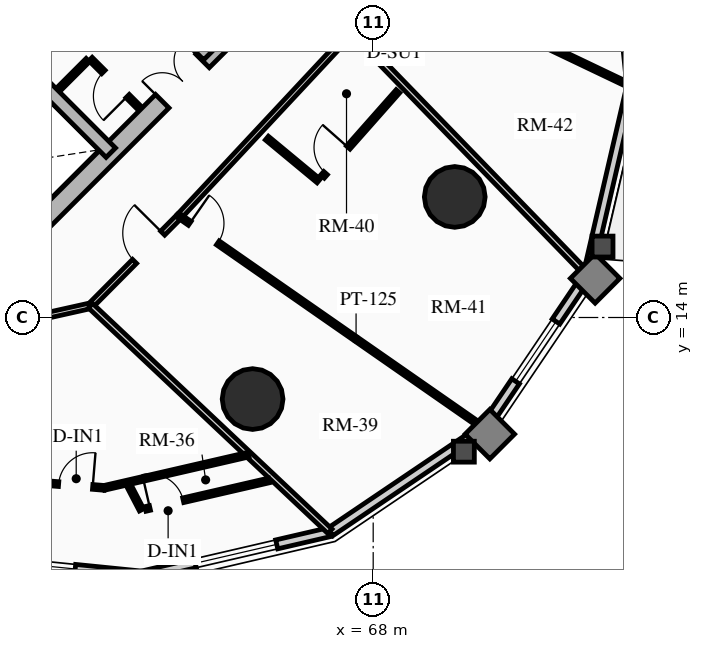
"""IFC4 building model, lengths in metres.
Left out: names, types, materials, properties, quantities, classifications, styles, units other than length and angle.
Written with IfcOpenShell. Run it as: python <this file> out.ifc"""

import sys

from ifc_helpers import new_model, si_unit, direction, frame, frame_2d, origin, origin_2d, place, context, subcontext, project, spatial, rectangle, circle, extrude, source, transform, mapped, element, fill, save


model = new_model("IFC4")
c1 = context("Model", 3, precision=1e-05, world=origin(), true_north=direction((0.0, 1.0)))
c2 = subcontext(c1, "Body", "Model", "MODEL_VIEW")
j1 = project(units=[si_unit("LENGTHUNIT", "METRE"), si_unit("PLANEANGLEUNIT", "RADIAN")], contexts=[c1])
p1 = place(None, origin())
s1 = spatial("IfcSite", under=j1, at=p1, CompositionType="ELEMENT")
p2 = place(p1, origin())
s2 = spatial("IfcBuilding", under=s1, at=p2, CompositionType="ELEMENT")
p3 = place(p2, frame((0.0, 0.0, 39.46)))
s3 = spatial("IfcBuildingStorey", under=s2, at=p3, CompositionType="ELEMENT", Elevation=39.46)
p4 = place(p3, frame((58.596, 15.838, 0.0), z_axis=(0.0, 0.0, 1.0), x_axis=(0.707106781187, 0.707106781187, 0.0)))
e1 = element("IfcWall", 1, at=p4, inside=s3, PredefinedType="SHEAR", context=c2, shape_type="SweptSolid", body=[
    extrude(rectangle(XDim=10.7, YDim=0.5, at=frame_2d((5.35, 0.0))), origin(), (0.0, 0.0, 1.0), 2.91),
])
m1 = source(origin(), c2, "Body", "SweptSolid", [
    extrude(rectangle(XDim=1.5, YDim=2.02, at=frame_2d((0.75, 1.01))), frame((0.0, 0.26, 0.0), z_axis=(0.0, -1.0, 0.0), x_axis=(1.0, 0.0, 0.0)), (0.0, 0.0, 1.0), 0.52),
])
p5 = place(p4, frame((5.45, 0.0, 0.0)))
e2 = element("IfcOpeningElement", 2, at=p5, cuts=e1, PredefinedType="OPENING", context=c2, shape_type="MappedRepresentation", body=[
    mapped(m1, transform((0.0, 0.0, 0.0), x_axis=(1.0, 0.0, 0.0), y_axis=(0.0, 1.0, 0.0), z_axis=(0.0, 0.0, 1.0), scale=1.0)),
])
p6 = place(p3, frame((61.096, 18.338, 0.0), z_axis=(0.0, 0.0, 1.0), x_axis=(-0.707106781187, 0.707106781187, 0.0)))
e3 = element("IfcWall", 3, at=p6, inside=s3, PredefinedType="SHEAR", context=c2, shape_type="SweptSolid", body=[
    extrude(rectangle(XDim=13.8, YDim=0.35, at=frame_2d((6.9, 0.0))), origin(), (0.0, 0.0, 1.0), 2.91),
])
m2 = source(origin(), c2, "Body", "SweptSolid", [
    extrude(rectangle(XDim=1.1, YDim=2.015, at=frame_2d((0.55, 1.007))), frame((0.0, 0.185, 0.0), z_axis=(0.0, -1.0, 0.0), x_axis=(1.0, 0.0, 0.0)), (0.0, 0.0, 1.0), 0.37),
])
p7 = place(p6, frame((4.9, 0.0, 0.0)))
e4 = element("IfcOpeningElement", 4, at=p7, cuts=e3, PredefinedType="OPENING", context=c2, shape_type="MappedRepresentation", body=[
    mapped(m2, transform((0.0, 0.0, 0.0), x_axis=(1.0, 0.0, 0.0), y_axis=(0.0, 1.0, 0.0), z_axis=(0.0, 0.0, 1.0), scale=1.0)),
])
m3 = source(origin(), c2, "Body", "SweptSolid", [
    extrude(rectangle(XDim=1.15, YDim=2.02, at=frame_2d((0.575, 1.01))), frame((0.0, 0.185, 0.0), z_axis=(0.0, -1.0, 0.0), x_axis=(1.0, 0.0, 0.0)), (0.0, 0.0, 1.0), 0.37),
])
p8 = place(p6, frame((7.32, 0.0, 0.0)))
e5 = element("IfcOpeningElement", 5, at=p8, cuts=e3, PredefinedType="OPENING", context=c2, shape_type="MappedRepresentation", body=[
    mapped(m3, transform((0.0, 0.0, 0.0), x_axis=(1.0, 0.0, 0.0), y_axis=(0.0, 1.0, 0.0), z_axis=(0.0, 0.0, 1.0), scale=1.0)),
])
p9 = place(p3, frame((63.662, 20.904, 0.0), z_axis=(0.0, 0.0, 1.0), x_axis=(-0.707106781187, 0.707106781187, 0.0)))
e6 = element("IfcWall", 6, at=p9, inside=s3, PredefinedType="SHEAR", context=c2, shape_type="SweptSolid", body=[
    extrude(rectangle(XDim=13.8, YDim=0.35, at=frame_2d((6.9, 0.0))), origin(), (0.0, 0.0, 1.0), 2.91),
])
p10 = place(p9, frame((10.025, 0.0, 0.0)))
e7 = element("IfcOpeningElement", 7, at=p10, cuts=e6, PredefinedType="OPENING", context=c2, shape_type="MappedRepresentation", body=[
    mapped(m2, transform((0.0, 0.0, 0.0), x_axis=(1.0, 0.0, 0.0), y_axis=(0.0, 1.0, 0.0), z_axis=(0.0, 0.0, 1.0), scale=1.0)),
])
p11 = place(p9, frame((12.025, 0.0, 0.0)))
e8 = element("IfcOpeningElement", 8, at=p11, cuts=e6, PredefinedType="OPENING", context=c2, shape_type="MappedRepresentation", body=[
    mapped(m2, transform((0.0, 0.0, 0.0), x_axis=(1.0, 0.0, 0.0), y_axis=(0.0, 1.0, 0.0), z_axis=(0.0, 0.0, 1.0), scale=1.0)),
])
p12 = place(p9, frame((5.33, 0.0, 0.0)))
e9 = element("IfcOpeningElement", 9, at=p12, cuts=e6, PredefinedType="OPENING", context=c2, shape_type="MappedRepresentation", body=[
    mapped(m3, transform((0.0, 0.0, 0.0), x_axis=(1.0, 0.0, 0.0), y_axis=(0.0, 1.0, 0.0), z_axis=(0.0, 0.0, 1.0), scale=1.0)),
])
for number, where, z_axis, x_axis in (
    (10, (64.827, 11.854, 0.0), (0.0, 0.0, 1.0), (1.0, 0.0, 0.0)),
    (11, (70.146, 17.173, 0.0), (0.0, 0.0, 1.0), (1.0, 0.0, 0.0)),
):
    element("IfcColumn", number, at=place(p3, frame(where, z_axis=z_axis, x_axis=x_axis)), inside=s3, PredefinedType="USERDEFINED", context=c2, shape_type="SweptSolid", body=[
        extrude(circle(Radius=0.8, at=origin_2d()), origin(), (0.0, 0.0, 1.0), 2.91),
    ])
p13 = place(p3, frame((61.91, 7.206, 0.0), z_axis=(0.0, 0.0, 1.0), x_axis=(-0.994968263437, 0.100190592135, 0.0)))
e12 = element("IfcWall", 12, at=p13, inside=s3, PredefinedType="SOLIDWALL", context=c2, shape_type="SweptSolid", body=[
    extrude(rectangle(XDim=5.419, YDim=0.24, at=frame_2d((2.71, 0.0))), origin(), (0.0, 0.0, 1.0), 2.073),
])
m4 = source(origin(), c2, "Body", "SweptSolid", [
    extrude(rectangle(XDim=1.9, YDim=1.35, at=frame_2d((0.95, 0.675))), frame((0.0, 0.13, 0.0), z_axis=(0.0, -1.0, 0.0), x_axis=(1.0, 0.0, 0.0)), (0.0, 0.0, 1.0), 0.26),
])
p14 = place(p13, frame((1.76, 0.0, 0.65)))
e13 = element("IfcOpeningElement", 13, at=p14, cuts=e12, PredefinedType="OPENING", context=c2, shape_type="MappedRepresentation", body=[
    mapped(m4, transform((0.0, 0.0, 0.0), x_axis=(1.0, 0.0, 0.0), y_axis=(0.0, 1.0, 0.0), z_axis=(0.0, 0.0, 1.0), scale=1.0)),
])
p15 = place(p3, frame((66.871, 8.356, 0.0), z_axis=(0.0, 0.0, 1.0), x_axis=(-0.974167686491, -0.22582585901, 0.0)))
e14 = element("IfcWall", 14, at=p15, inside=s3, PredefinedType="SOLIDWALL", context=c2, shape_type="SweptSolid", body=[
    extrude(rectangle(XDim=5.092, YDim=0.24, at=frame_2d((2.546, 0.0))), origin(), (0.0, 0.0, 1.0), 2.073),
])
m5 = source(origin(), c2, "Body", "SweptSolid", [
    extrude(rectangle(XDim=2.2, YDim=1.35, at=frame_2d((1.1, 0.675))), frame((0.0, 0.13, 0.0), z_axis=(0.0, -1.0, 0.0), x_axis=(1.0, 0.0, 0.0)), (0.0, 0.0, 1.0), 0.26),
])
p16 = place(p15, frame((1.446, 0.0, 0.65)))
e15 = element("IfcOpeningElement", 15, at=p16, cuts=e14, PredefinedType="OPENING", context=c2, shape_type="MappedRepresentation", body=[
    mapped(m5, transform((0.0, 0.0, 0.0), x_axis=(1.0, 0.0, 0.0), y_axis=(0.0, 1.0, 0.0), z_axis=(0.0, 0.0, 1.0), scale=1.0)),
])
p17 = place(p3, frame((70.914, 11.086, 0.0), z_axis=(0.0, 0.0, 1.0), x_axis=(-0.828748297084, -0.559621532896, 0.0)))
e16 = element("IfcWall", 16, at=p17, inside=s3, PredefinedType="SOLIDWALL", context=c2, shape_type="SweptSolid", body=[
    extrude(rectangle(XDim=4.879, YDim=0.24, at=frame_2d((2.439, 0.0))), origin(), (0.0, 0.0, 1.0), 2.073),
])
p18 = place(p3, frame((73.644, 15.129, 0.0), z_axis=(0.0, 0.0, 1.0), x_axis=(-0.559621532896, -0.828748297084, 0.0)))
e17 = element("IfcWall", 17, at=p18, inside=s3, PredefinedType="SOLIDWALL", context=c2, shape_type="SweptSolid", body=[
    extrude(rectangle(XDim=4.879, YDim=0.24, at=frame_2d((2.439, 0.0))), origin(), (0.0, 0.0, 1.0), 2.073),
])
p19 = place(p18, frame((1.489, 0.0, 0.65)))
e18 = element("IfcOpeningElement", 18, at=p19, cuts=e17, PredefinedType="OPENING", context=c2, shape_type="MappedRepresentation", body=[
    mapped(m4, transform((0.0, 0.0, 0.0), x_axis=(1.0, 0.0, 0.0), y_axis=(0.0, 1.0, 0.0), z_axis=(0.0, 0.0, 1.0), scale=1.0)),
])
p20 = place(p3, frame((74.794, 20.09, 0.0), z_axis=(0.0, 0.0, 1.0), x_axis=(-0.22582585901, -0.974167686491, 0.0)))
e19 = element("IfcWall", 19, at=p20, inside=s3, PredefinedType="SOLIDWALL", context=c2, shape_type="SweptSolid", body=[
    extrude(rectangle(XDim=5.092, YDim=0.24, at=frame_2d((2.546, 0.0))), origin(), (0.0, 0.0, 1.0), 2.073),
])
p21 = place(p3, frame((74.251, 25.482, 0.0), z_axis=(0.0, 0.0, 1.0), x_axis=(0.100190592135, -0.994968263437, 0.0)))
e20 = element("IfcWall", 20, at=p21, inside=s3, PredefinedType="SOLIDWALL", context=c2, shape_type="SweptSolid", body=[
    extrude(rectangle(XDim=5.419, YDim=0.24, at=frame_2d((2.71, 0.0))), origin(), (0.0, 0.0, 1.0), 2.073),
])
p22 = place(p21, frame((1.76, 0.0, 0.65)))
e21 = element("IfcOpeningElement", 21, at=p22, cuts=e20, PredefinedType="OPENING", context=c2, shape_type="MappedRepresentation", body=[
    mapped(m4, transform((0.0, 0.0, 0.0), x_axis=(1.0, 0.0, 0.0), y_axis=(0.0, 1.0, 0.0), z_axis=(0.0, 0.0, 1.0), scale=1.0)),
])
p23 = place(p3, frame((61.835, 19.529, 0.0), z_axis=(0.0, 0.0, 1.0), x_axis=(-0.707174592913, 0.707038962956, 0.0)))
e22 = element("IfcWall", 22, at=p23, inside=s3, PredefinedType="PARTITIONING", context=c2, shape_type="SweptSolid", body=[
    extrude(rectangle(XDim=1.8, YDim=0.125, at=frame_2d((0.9, 0.0))), origin(), (0.0, 0.0, 1.0), 2.635),
])
m6 = source(origin(), c2, "Body", "SweptSolid", [
    extrude(rectangle(XDim=0.9, YDim=2.005, at=frame_2d((0.45, 1.002))), frame((0.0, 0.073, 0.0), z_axis=(0.0, -1.0, 0.0), x_axis=(1.0, 0.0, 0.0)), (0.0, 0.0, 1.0), 0.145),
])
p24 = place(p23, frame((0.42, 0.0, 0.0)))
e23 = element("IfcOpeningElement", 23, at=p24, cuts=e22, PredefinedType="OPENING", context=c2, shape_type="MappedRepresentation", body=[
    mapped(m6, transform((0.0, 0.0, 0.0), x_axis=(1.0, 0.0, 0.0), y_axis=(0.0, 1.0, 0.0), z_axis=(0.0, 0.0, 1.0), scale=1.0)),
])
p25 = place(p3, frame((59.713, 19.996, 0.0), z_axis=(0.0, 0.0, 1.0), x_axis=(0.707217726, 0.706995818963, 0.0)))
e24 = element("IfcWall", 24, at=p25, inside=s3, PredefinedType="PARTITIONING", context=c2, shape_type="SweptSolid", body=[
    extrude(rectangle(XDim=1.1, YDim=0.125, at=frame_2d((0.55, 0.0))), origin(), (0.0, 0.0, 1.0), 2.635),
])
p26 = place(p3, frame((59.008, 13.963, 0.0), z_axis=(0.0, 0.0, 1.0), x_axis=(0.976020856791, 0.21767702476, 0.0)))
e25 = element("IfcWall", 25, at=p26, inside=s3, PredefinedType="PARTITIONING", context=c2, shape_type="SweptSolid", body=[
    extrude(rectangle(XDim=1.593, YDim=0.15, at=frame_2d((0.796, 0.0))), origin(), (0.0, 0.0, 1.0), 2.205),
])
p27 = place(p3, frame((60.562, 14.31, 0.0), z_axis=(0.0, 0.0, 1.0), x_axis=(0.704566236161, 0.709638230975, 0.0)))
e26 = element("IfcWall", 26, at=p27, inside=s3, PredefinedType="PARTITIONING", context=c2, shape_type="SweptSolid", body=[
    extrude(rectangle(XDim=3.321, YDim=0.15, at=frame_2d((1.661, 0.0))), origin(), (0.0, 0.0, 1.0), 2.159),
])
m7 = source(origin(), c2, "Body", "SweptSolid", [
    extrude(rectangle(XDim=1.05, YDim=2.015, at=frame_2d((0.525, 1.007))), frame((0.0, 0.085, 0.0), z_axis=(0.0, -1.0, 0.0), x_axis=(1.0, 0.0, 0.0)), (0.0, 0.0, 1.0), 0.17),
])
p28 = place(p27, frame((1.643, 0.0, 0.0)))
e27 = element("IfcOpeningElement", 27, at=p28, cuts=e26, PredefinedType="OPENING", context=c2, shape_type="MappedRepresentation", body=[
    mapped(m7, transform((0.0, 0.0, 0.0), x_axis=(1.0, 0.0, 0.0), y_axis=(0.0, 1.0, 0.0), z_axis=(0.0, 0.0, 1.0), scale=1.0)),
])
p29 = place(p3, frame((62.903, 16.667, 0.0), z_axis=(0.0, 0.0, 1.0), x_axis=(0.682371947497, 0.731005147225, 0.0)))
e28 = element("IfcWall", 28, at=p29, inside=s3, PredefinedType="PARTITIONING", context=c2, shape_type="SweptSolid", body=[
    extrude(rectangle(XDim=6.642, YDim=0.15, at=frame_2d((3.321, 0.0))), origin(), (0.0, 0.0, 1.0), 2.159),
])
p30 = place(p3, frame((60.562, 14.31, 0.0), z_axis=(0.0, 0.0, 1.0), x_axis=(0.727781661561, -0.685808904211, 0.0)))
e29 = element("IfcWall", 29, at=p30, inside=s3, PredefinedType="PARTITIONING", context=c2, shape_type="SweptSolid", body=[
    extrude(rectangle(XDim=8.655, YDim=0.16, at=frame_2d((4.328, 0.0))), origin(), (0.0, 0.0, 1.0), 2.073),
])
p31 = place(p3, frame((67.435, 21.521, 0.0), z_axis=(0.0, 0.0, 1.0), x_axis=(0.6962628802, -0.717786877601, 0.0)))
e30 = element("IfcWall", 30, at=p31, inside=s3, PredefinedType="PARTITIONING", context=c2, shape_type="SweptSolid", body=[
    extrude(rectangle(XDim=8.893, YDim=0.16, at=frame_2d((4.446, 0.0))), origin(), (0.0, 0.0, 1.0), 2.073),
])
p32 = place(p3, frame((56.858, 9.852, 0.0), z_axis=(0.0, 0.0, 1.0), x_axis=(0.996604967548, -0.082331881181, 0.0)))
e31 = element("IfcWall", 31, at=p32, inside=s3, PredefinedType="PARTITIONING", context=c2, shape_type="SweptSolid", body=[
    extrude(rectangle(XDim=4.077, YDim=0.125, at=frame_2d((2.039, 0.0))), origin(), (0.0, 0.0, 1.0), 2.635),
])
p33 = place(p32, frame((2.874, 0.0, 0.0)))
e32 = element("IfcOpeningElement", 32, at=p33, cuts=e31, PredefinedType="OPENING", context=c2, shape_type="MappedRepresentation", body=[
    mapped(m6, transform((0.0, 0.0, 0.0), x_axis=(1.0, 0.0, 0.0), y_axis=(0.0, 1.0, 0.0), z_axis=(0.0, 0.0, 1.0), scale=1.0)),
])
p34 = place(p3, frame((60.921, 9.517, 0.0), z_axis=(0.0, 0.0, 1.0), x_axis=(0.974453436038, 0.224589627973, 0.0)))
e33 = element("IfcWall", 33, at=p34, inside=s3, PredefinedType="PARTITIONING", context=c2, shape_type="SweptSolid", body=[
    extrude(rectangle(XDim=3.898, YDim=0.125, at=frame_2d((1.949, 0.0))), origin(), (0.0, 0.0, 1.0), 2.205),
])
p35 = place(p3, frame((61.564, 9.589, 0.0), z_axis=(0.0, 0.0, 1.0), x_axis=(0.462168536246, -0.886792108729, 0.0)))
e34 = element("IfcWall", 34, at=p35, inside=s3, PredefinedType="PARTITIONING", context=c2, shape_type="SweptSolid", body=[
    extrude(rectangle(XDim=0.735, YDim=0.125, at=frame_2d((0.367, 0.0))), origin(), (0.0, 0.0, 1.0), 2.635),
])
p36 = place(p3, frame((62.008, 8.962, 0.0), z_axis=(0.0, 0.0, 1.0), x_axis=(0.974365294983, 0.224971713626, 0.0)))
e35 = element("IfcWall", 35, at=p36, inside=s3, PredefinedType="PARTITIONING", context=c2, shape_type="SweptSolid", body=[
    extrude(rectangle(XDim=3.337, YDim=0.125, at=frame_2d((1.668, 0.0))), origin(), (0.0, 0.0, 1.0), 2.635),
])
p37 = place(p36, frame((0.12, 0.0, 0.0)))
e36 = element("IfcOpeningElement", 36, at=p37, cuts=e35, PredefinedType="OPENING", context=c2, shape_type="MappedRepresentation", body=[
    mapped(m6, transform((0.0, 0.0, 0.0), x_axis=(1.0, 0.0, 0.0), y_axis=(0.0, 1.0, 0.0), z_axis=(0.0, 0.0, 1.0), scale=1.0)),
])
p38 = place(p3, frame((62.903, 16.667, 0.0), z_axis=(0.0, 0.0, 1.0), x_axis=(0.820761665638, -0.571270766116, 0.0)))
e37 = element("IfcWall", 37, at=p38, inside=s3, PredefinedType="PARTITIONING", context=c2, shape_type="SweptSolid", body=[
    extrude(rectangle(XDim=9.743, YDim=0.125, at=frame_2d((4.872, 0.0))), origin(), (0.0, 0.0, 1.0), 2.073),
])
p39 = place(p38, frame((0.33, 0.0, 0.0)))
e38 = element("IfcOpeningElement", 38, at=p39, cuts=e37, PredefinedType="OPENING", context=c2, shape_type="MappedRepresentation", body=[
    mapped(m6, transform((0.0, 0.0, 0.0), x_axis=(1.0, 0.0, 0.0), y_axis=(0.0, 1.0, 0.0), z_axis=(0.0, 0.0, 1.0), scale=1.0)),
])
p40 = place(p3, frame((65.202, 18.721, 0.0), z_axis=(0.0, 0.0, 1.0), x_axis=(0.769814202386, -0.638268042287, 0.0)))
e39 = element("IfcWall", 39, at=p40, inside=s3, PredefinedType="PARTITIONING", context=c2, shape_type="SweptSolid", body=[
    extrude(rectangle(XDim=1.769, YDim=0.125, at=frame_2d((0.884, 0.0))), origin(), (0.0, 0.0, 1.0), 2.635),
])
p41 = place(p3, frame((66.667, 17.709, 0.0), z_axis=(0.0, 0.0, 1.0), x_axis=(0.662510581678, 0.749052554341, 0.0)))
e40 = element("IfcWall", 40, at=p41, inside=s3, PredefinedType="PARTITIONING", context=c2, shape_type="SweptSolid", body=[
    extrude(rectangle(XDim=2.996, YDim=0.125, at=frame_2d((1.498, 0.0))), origin(), (0.0, 0.0, 1.0), 2.159),
])
p42 = place(p41, frame((0.12, 0.0, 0.0)))
e41 = element("IfcOpeningElement", 41, at=p42, cuts=e40, PredefinedType="OPENING", context=c2, shape_type="MappedRepresentation", body=[
    mapped(m6, transform((0.0, 0.0, 0.0), x_axis=(1.0, 0.0, 0.0), y_axis=(0.0, 1.0, 0.0), z_axis=(0.0, 0.0, 1.0), scale=1.0)),
])
p43 = place(p3, frame((68.456, 23.11, 0.0), z_axis=(0.0, 0.0, 1.0), x_axis=(0.902430819297, -0.430834790125, 0.0)))
e42 = element("IfcWall", 42, at=p43, inside=s3, PredefinedType="PARTITIONING", context=c2, shape_type="SweptSolid", body=[
    extrude(rectangle(XDim=7.002, YDim=0.125, at=frame_2d((3.501, 0.0))), origin(), (0.0, 0.0, 1.0), 2.073),
])
p44 = place(p43, frame((1.8, 0.0, 0.0)))
e43 = element("IfcOpeningElement", 43, at=p44, cuts=e42, PredefinedType="OPENING", context=c2, shape_type="MappedRepresentation", body=[
    mapped(m6, transform((0.0, 0.0, 0.0), x_axis=(1.0, 0.0, 0.0), y_axis=(0.0, 1.0, 0.0), z_axis=(0.0, 0.0, 1.0), scale=1.0)),
])
m8 = source(origin(), c2, "Body", "SweptSolid", [
    extrude(rectangle(XDim=1.9, YDim=1.35, at=frame_2d((0.95, 0.675))), frame((0.0, 0.03, 0.0), z_axis=(0.0, -1.0, 0.0), x_axis=(1.0, 0.0, 0.0)), (0.0, 0.0, 1.0), 0.06),
])
p45 = place(p14, origin())
e44 = element("IfcWindow", 44, at=p45, inside=s3, PartitioningType="DOUBLE_PANEL_VERTICAL", PredefinedType="WINDOW", context=c2, shape_type="MappedRepresentation", body=[
    mapped(m8, transform((0.0, 0.0, 0.0), x_axis=(1.0, 0.0, 0.0), y_axis=(0.0, 1.0, 0.0), z_axis=(0.0, 0.0, 1.0), scale=1.0)),
])
fill(e13, e44)
m9 = source(origin(), c2, "Body", "SweptSolid", [
    extrude(rectangle(XDim=2.2, YDim=1.35, at=frame_2d((1.1, 0.675))), frame((0.0, 0.03, 0.0), z_axis=(0.0, -1.0, 0.0), x_axis=(1.0, 0.0, 0.0)), (0.0, 0.0, 1.0), 0.06),
])
p46 = place(p16, origin())
e45 = element("IfcWindow", 45, at=p46, inside=s3, PartitioningType="DOUBLE_PANEL_VERTICAL", PredefinedType="WINDOW", context=c2, shape_type="MappedRepresentation", body=[
    mapped(m9, transform((0.0, 0.0, 0.0), x_axis=(1.0, 0.0, 0.0), y_axis=(0.0, 1.0, 0.0), z_axis=(0.0, 0.0, 1.0), scale=1.0)),
])
fill(e15, e45)
p47 = place(p19, origin())
e46 = element("IfcWindow", 46, at=p47, inside=s3, PartitioningType="DOUBLE_PANEL_VERTICAL", PredefinedType="WINDOW", context=c2, shape_type="MappedRepresentation", body=[
    mapped(m8, transform((0.0, 0.0, 0.0), x_axis=(1.0, 0.0, 0.0), y_axis=(0.0, 1.0, 0.0), z_axis=(0.0, 0.0, 1.0), scale=1.0)),
])
fill(e18, e46)
m10 = source(origin(), c2, "Body", "SweptSolid", [
    extrude(rectangle(XDim=1.5, YDim=2.02, at=frame_2d((0.75, 1.01))), frame((0.0, 0.025, 0.0), z_axis=(0.0, -1.0, 0.0), x_axis=(1.0, 0.0, 0.0)), (0.0, 0.0, 1.0), 0.05),
])
p48 = place(p5, origin())
e47 = element("IfcDoor", 47, at=p48, inside=s3, OperationType="DOUBLE_DOOR_SINGLE_SWING", PredefinedType="DOOR", context=c2, shape_type="MappedRepresentation", body=[
    mapped(m10, transform((0.0, 0.0, 0.0), x_axis=(1.0, 0.0, 0.0), y_axis=(0.0, 1.0, 0.0), z_axis=(0.0, 0.0, 1.0), scale=1.0)),
])
fill(e2, e47)
m11 = source(origin(), c2, "Body", "SweptSolid", [
    extrude(rectangle(XDim=0.9, YDim=2.005, at=frame_2d((0.45, 1.002))), frame((0.0, 0.025, 0.0), z_axis=(0.0, -1.0, 0.0), x_axis=(1.0, 0.0, 0.0)), (0.0, 0.0, 1.0), 0.05),
])
p49 = place(p24, origin())
e48 = element("IfcDoor", 48, at=p49, inside=s3, OperationType="SINGLE_SWING_LEFT", PredefinedType="DOOR", context=c2, shape_type="MappedRepresentation", body=[
    mapped(m11, transform((0.0, 0.0, 0.0), x_axis=(1.0, 0.0, 0.0), y_axis=(0.0, 1.0, 0.0), z_axis=(0.0, 0.0, 1.0), scale=1.0)),
])
fill(e23, e48)
p50 = place(p33, origin())
e49 = element("IfcDoor", 49, at=p50, inside=s3, OperationType="SINGLE_SWING_RIGHT", PredefinedType="DOOR", context=c2, shape_type="MappedRepresentation", body=[
    mapped(m11, transform((0.0, 0.0, 0.0), x_axis=(1.0, 0.0, 0.0), y_axis=(0.0, 1.0, 0.0), z_axis=(0.0, 0.0, 1.0), scale=1.0)),
])
fill(e32, e49)
p51 = place(p37, origin())
e50 = element("IfcDoor", 50, at=p51, inside=s3, OperationType="SINGLE_SWING_LEFT", PredefinedType="DOOR", context=c2, shape_type="MappedRepresentation", body=[
    mapped(m11, transform((0.0, 0.0, 0.0), x_axis=(1.0, 0.0, 0.0), y_axis=(0.0, 1.0, 0.0), z_axis=(0.0, 0.0, 1.0), scale=1.0)),
])
fill(e36, e50)
m12 = source(origin(), c2, "Body", "SweptSolid", [
    extrude(rectangle(XDim=1.05, YDim=2.015, at=frame_2d((0.525, 1.007))), frame((0.0, 0.025, 0.0), z_axis=(0.0, -1.0, 0.0), x_axis=(1.0, 0.0, 0.0)), (0.0, 0.0, 1.0), 0.05),
])
p52 = place(p28, origin())
e51 = element("IfcDoor", 51, at=p52, inside=s3, OperationType="SINGLE_SWING_RIGHT", PredefinedType="DOOR", context=c2, shape_type="MappedRepresentation", body=[
    mapped(m12, transform((0.0, 0.0, 0.0), x_axis=(1.0, 0.0, 0.0), y_axis=(0.0, 1.0, 0.0), z_axis=(0.0, 0.0, 1.0), scale=1.0)),
])
fill(e27, e51)
p53 = place(p39, origin())
e52 = element("IfcDoor", 52, at=p53, inside=s3, OperationType="SINGLE_SWING_LEFT", PredefinedType="DOOR", context=c2, shape_type="MappedRepresentation", body=[
    mapped(m11, transform((0.0, 0.0, 0.0), x_axis=(1.0, 0.0, 0.0), y_axis=(0.0, 1.0, 0.0), z_axis=(0.0, 0.0, 1.0), scale=1.0)),
])
fill(e38, e52)
p54 = place(p42, origin())
e53 = element("IfcDoor", 53, at=p54, inside=s3, OperationType="SINGLE_SWING_RIGHT", PredefinedType="DOOR", context=c2, shape_type="MappedRepresentation", body=[
    mapped(m11, transform((0.0, 0.0, 0.0), x_axis=(1.0, 0.0, 0.0), y_axis=(0.0, 1.0, 0.0), z_axis=(0.0, 0.0, 1.0), scale=1.0)),
])
fill(e41, e53)
save(model, sys.argv[1])
